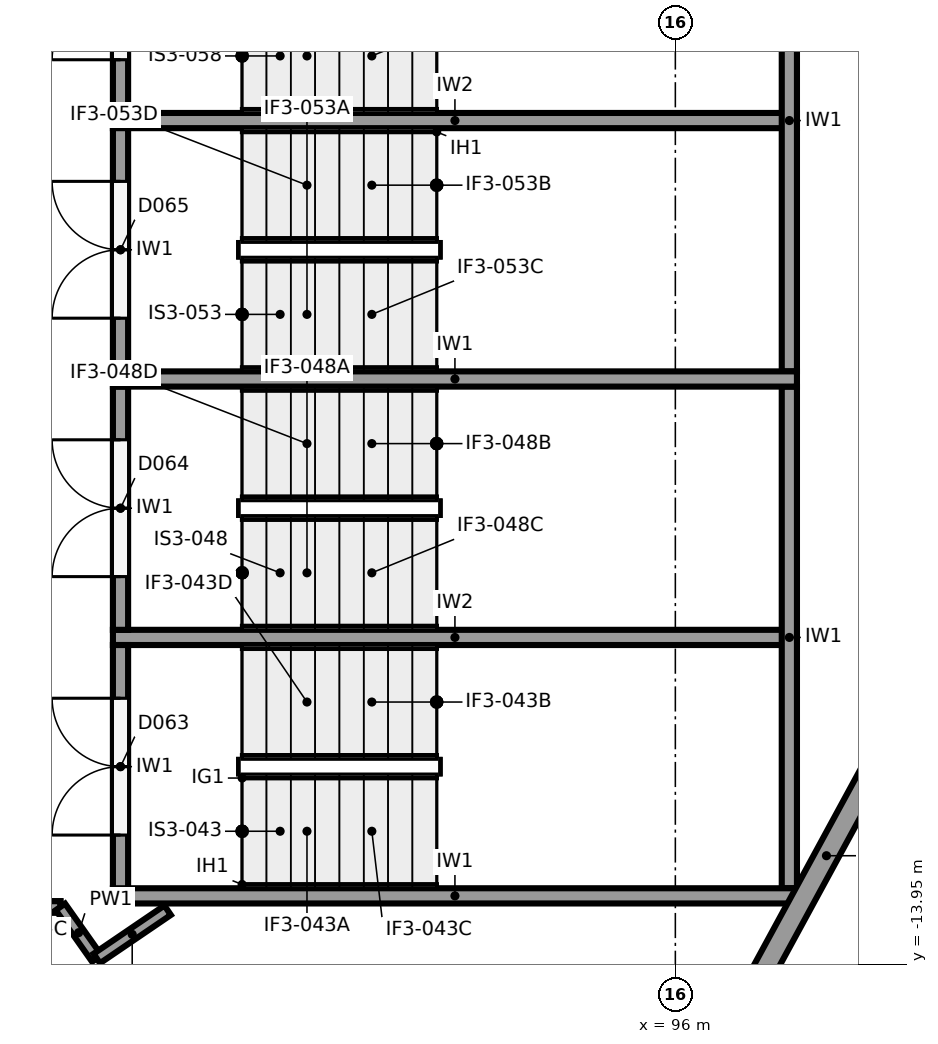
"""IFC4 building model, lengths in metres.
Left out: names, types, materials, properties, quantities, classifications, styles, units other than length and angle.
Written with IfcOpenShell. Run it as: python <this file> out.ifc"""

import sys

from ifc_helpers import new_model, si_unit, direction, frame, frame_2d, origin, place, context, subcontext, project, spatial, rectangle, extrude, element, fill, save


model = new_model("IFC4")
c1 = context("Model", 3, precision=1e-05, world=origin(), true_north=direction((0.0, 1.0)))
c2 = subcontext(c1, "Body", "Model", "MODEL_VIEW")
j1 = project(units=[si_unit("LENGTHUNIT", "METRE"), si_unit("PLANEANGLEUNIT", "RADIAN")], contexts=[c1])
p1 = place(None, origin())
s1 = spatial("IfcSite", under=j1, at=p1, CompositionType="ELEMENT")
p2 = place(p1, origin())
s2 = spatial("IfcBuilding", under=s1, at=p2, CompositionType="ELEMENT")
p3 = place(p2, frame((0.0, 0.0, 6.5)))
s3 = spatial("IfcBuildingStorey", under=s2, at=p3, CompositionType="ELEMENT", Elevation=6.5)
p4 = place(p3, frame((101.161, -6.689, 0.0), z_axis=(0.0, 0.0, 1.0), x_axis=(-0.477867771117, -0.878431780691, 0.0)))
e1 = element("IfcWall", 1, at=p4, inside=s3, PredefinedType="SOLIDWALL", context=c2, shape_type="SweptSolid", body=[
    extrude(rectangle(XDim=13.28, YDim=0.3, at=frame_2d((6.64, 0.0))), origin(), (0.0, 0.0, 1.0), 3.85),
])
p5 = place(p4, frame((9.03, 0.0, 0.0)))
e2 = element("IfcOpeningElement", 2, at=p5, cuts=e1, PredefinedType="OPENING", context=c2, shape_type="SweptSolid", body=[
    extrude(rectangle(XDim=1.8, YDim=2.4, at=frame_2d((0.9, 1.2))), frame((0.0, 0.16, 0.0), z_axis=(0.0, -1.0, 0.0), x_axis=(1.0, 0.0, 0.0)), (0.0, 0.0, 1.0), 0.32),
])
p6 = place(p3, frame((94.815, 5.855, 0.0), z_axis=(0.0, 0.0, 1.0), x_axis=(0.477867771117, -0.878431780691, 0.0)))
e3 = element("IfcWall", 3, at=p6, inside=s3, PredefinedType="SOLIDWALL", context=c2, shape_type="SweptSolid", body=[
    extrude(rectangle(XDim=13.28, YDim=0.35, at=frame_2d((6.64, 0.0))), origin(), (0.0, 0.0, 1.0), 3.85),
])
p7 = place(p6, frame((3.95, 0.0, 0.0)))
e4 = element("IfcOpeningElement", 4, at=p7, cuts=e3, PredefinedType="OPENING", context=c2, shape_type="SweptSolid", body=[
    extrude(rectangle(XDim=1.0, YDim=2.1, at=frame_2d((0.5, 1.05))), frame((0.0, 0.185, 0.0), z_axis=(0.0, -1.0, 0.0), x_axis=(1.0, 0.0, 0.0)), (0.0, 0.0, 1.0), 0.37),
])
for number, where, z_axis, x_axis in (
    (5, (97.6, -13.05, 0.0), (0.0, 0.0, 1.0), (-1.0, 0.0, 0.0)),
    (6, (97.6, -6.25, 0.0), (0.0, 0.0, 1.0), (-1.0, 0.0, 0.0)),
):
    element("IfcWall", number, at=place(p3, frame(where, z_axis=z_axis, x_axis=x_axis)), inside=s3, PredefinedType="SHEAR", context=c2, shape_type="SweptSolid", body=[
        extrude(rectangle(XDim=9.0, YDim=0.2, at=frame_2d((4.5, 0.0))), origin(), (0.0, 0.0, 1.0), 5.15),
    ])
for number, where, z_axis, x_axis in (
    (7, (97.5, -12.95, 0.0), (0.0, 0.0, 1.0), (0.0, 1.0, 0.0)),
    (8, (97.5, -6.15, 0.0), (0.0, 0.0, 1.0), (0.0, 1.0, 0.0)),
):
    element("IfcWall", number, at=place(p3, frame(where, z_axis=z_axis, x_axis=x_axis)), inside=s3, PredefinedType="SHEAR", context=c2, shape_type="SweptSolid", body=[
        extrude(rectangle(XDim=6.6, YDim=0.2, at=frame_2d((3.3, 0.0))), origin(), (0.0, 0.0, 1.0), 5.15),
    ])
for number, where, z_axis, x_axis in (
    (9, (97.6, -9.65, 0.0), (0.0, 0.0, 1.0), (-1.0, 0.0, 0.0)),
    (10, (97.6, -2.85, 0.0), (0.0, 0.0, 1.0), (-1.0, 0.0, 0.0)),
):
    element("IfcWall", number, at=place(p3, frame(where, z_axis=z_axis, x_axis=x_axis)), inside=s3, PredefinedType="SHEAR", context=c2, shape_type="SweptSolid", body=[
        extrude(rectangle(XDim=9.0, YDim=0.2, at=frame_2d((4.5, 0.0))), origin(), (0.0, 0.0, 1.0), 5.15),
    ])
p8 = place(p3, frame((88.7, -12.95, 0.0), z_axis=(0.0, 0.0, 1.0), x_axis=(0.0, 1.0, 0.0)))
e11 = element("IfcWall", 11, at=p8, inside=s3, PredefinedType="SHEAR", context=c2, shape_type="SweptSolid", body=[
    extrude(rectangle(XDim=3.2, YDim=0.2, at=frame_2d((1.6, 0.0))), origin(), (0.0, 0.0, 1.0), 5.15),
])
p9 = place(p8, frame((0.7, 0.0, 0.0)))
e12 = element("IfcOpeningElement", 12, at=p9, cuts=e11, PredefinedType="OPENING", context=c2, shape_type="SweptSolid", body=[
    extrude(rectangle(XDim=1.8, YDim=2.1, at=frame_2d((0.9, 1.05))), frame((0.0, 0.11, 0.0), z_axis=(0.0, -1.0, 0.0), x_axis=(1.0, 0.0, 0.0)), (0.0, 0.0, 1.0), 0.22),
])
p10 = place(p3, frame((88.7, -9.55, 0.0), z_axis=(0.0, 0.0, 1.0), x_axis=(0.0, 1.0, 0.0)))
e13 = element("IfcWall", 13, at=p10, inside=s3, PredefinedType="SHEAR", context=c2, shape_type="SweptSolid", body=[
    extrude(rectangle(XDim=3.2, YDim=0.2, at=frame_2d((1.6, 0.0))), origin(), (0.0, 0.0, 1.0), 5.15),
])
p11 = place(p10, frame((0.7, 0.0, 0.0)))
e14 = element("IfcOpeningElement", 14, at=p11, cuts=e13, PredefinedType="OPENING", context=c2, shape_type="SweptSolid", body=[
    extrude(rectangle(XDim=1.8, YDim=2.1, at=frame_2d((0.9, 1.05))), frame((0.0, 0.11, 0.0), z_axis=(0.0, -1.0, 0.0), x_axis=(1.0, 0.0, 0.0)), (0.0, 0.0, 1.0), 0.22),
])
p12 = place(p3, frame((88.7, -6.15, 0.0), z_axis=(0.0, 0.0, 1.0), x_axis=(0.0, 1.0, 0.0)))
e15 = element("IfcWall", 15, at=p12, inside=s3, PredefinedType="SHEAR", context=c2, shape_type="SweptSolid", body=[
    extrude(rectangle(XDim=3.2, YDim=0.2, at=frame_2d((1.6, 0.0))), origin(), (0.0, 0.0, 1.0), 5.15),
])
p13 = place(p12, frame((0.7, 0.0, 0.0)))
e16 = element("IfcOpeningElement", 16, at=p13, cuts=e15, PredefinedType="OPENING", context=c2, shape_type="SweptSolid", body=[
    extrude(rectangle(XDim=1.8, YDim=2.1, at=frame_2d((0.9, 1.05))), frame((0.0, 0.11, 0.0), z_axis=(0.0, -1.0, 0.0), x_axis=(1.0, 0.0, 0.0)), (0.0, 0.0, 1.0), 0.22),
])
p14 = place(p3, frame((88.7, -2.75, 0.0), z_axis=(0.0, 0.0, 1.0), x_axis=(0.0, 1.0, 0.0)))
e17 = element("IfcWall", 17, at=p14, inside=s3, PredefinedType="SHEAR", context=c2, shape_type="SweptSolid", body=[
    extrude(rectangle(XDim=3.2, YDim=0.2, at=frame_2d((1.6, 0.0))), origin(), (0.0, 0.0, 1.0), 5.15),
])
p15 = place(p14, frame((0.7, 0.0, 0.0)))
e18 = element("IfcOpeningElement", 18, at=p15, cuts=e17, PredefinedType="OPENING", context=c2, shape_type="SweptSolid", body=[
    extrude(rectangle(XDim=1.8, YDim=2.1, at=frame_2d((0.9, 1.05))), frame((0.0, 0.11, 0.0), z_axis=(0.0, -1.0, 0.0), x_axis=(1.0, 0.0, 0.0)), (0.0, 0.0, 1.0), 0.22),
])
p16 = place(p3, frame((81.555, -13.195, 0.0), z_axis=(0.0, 0.0, 1.0), x_axis=(0.999999999262, -3.8421639e-05, 0.0)))
e19 = element("IfcWall", 19, at=p16, inside=s3, PredefinedType="PARTITIONING", context=c2, shape_type="SweptSolid", body=[
    extrude(rectangle(XDim=6.354, YDim=0.15, at=frame_2d((3.177, 0.0))), origin(), (0.0, 0.0, 1.0), 4.05),
])
p17 = place(p16, frame((3.85, 0.0, 0.0)))
e20 = element("IfcOpeningElement", 20, at=p17, cuts=e19, PredefinedType="OPENING", context=c2, shape_type="SweptSolid", body=[
    extrude(rectangle(XDim=1.8, YDim=2.1, at=frame_2d((0.9, 1.05))), frame((0.0, 0.085, 0.0), z_axis=(0.0, -1.0, 0.0), x_axis=(1.0, 0.0, 0.0)), (0.0, 0.0, 1.0), 0.17),
])
p18 = place(p3, frame((87.255, -13.195, 4.05), z_axis=(0.0, 0.0, 1.0), x_axis=(1.0, 0.0, 0.0)))
e21 = element("IfcWall", 21, at=p18, inside=s3, PredefinedType="PARTITIONING", context=c2, shape_type="SweptSolid", body=[
    extrude(rectangle(XDim=0.654, YDim=0.15, at=frame_2d((0.327, 0.0))), origin(), (0.0, 0.0, 1.0), 1.1),
])
p19 = place(p3, frame((87.909, -13.195, 0.0), z_axis=(0.0, 0.0, 1.0), x_axis=(0.576359888906, -0.817195985342, 0.0)))
e22 = element("IfcWall", 22, at=p19, inside=s3, PredefinedType="PARTITIONING", context=c2, shape_type="SweptSolid", body=[
    extrude(rectangle(XDim=0.83, YDim=0.15, at=frame_2d((0.415, 0.0))), origin(), (0.0, 0.0, 1.0), 5.15),
])
p20 = place(p3, frame((88.388, -13.874, 0.0), z_axis=(0.0, 0.0, 1.0), x_axis=(0.826749248939, 0.562570599462, 0.0)))
e23 = element("IfcWall", 23, at=p20, inside=s3, PredefinedType="PARTITIONING", context=c2, shape_type="SweptSolid", body=[
    extrude(rectangle(XDim=1.127, YDim=0.15, at=frame_2d((0.564, 0.0))), origin(), (0.0, 0.0, 1.0), 5.15),
])
p21 = place(p9, origin())
e24 = element("IfcDoor", 24, at=p21, inside=s3, OperationType="DOUBLE_DOOR_SINGLE_SWING", PredefinedType="DOOR", context=c2, shape_type="SweptSolid", body=[
    extrude(rectangle(XDim=1.8, YDim=2.1, at=frame_2d((0.9, 1.05))), frame((0.0, 0.025, 0.0), z_axis=(0.0, -1.0, 0.0), x_axis=(1.0, 0.0, 0.0)), (0.0, 0.0, 1.0), 0.05),
])
fill(e12, e24)
p22 = place(p11, origin())
e25 = element("IfcDoor", 25, at=p22, inside=s3, OperationType="DOUBLE_DOOR_SINGLE_SWING", PredefinedType="DOOR", context=c2, shape_type="SweptSolid", body=[
    extrude(rectangle(XDim=1.8, YDim=2.1, at=frame_2d((0.9, 1.05))), frame((0.0, 0.025, 0.0), z_axis=(0.0, -1.0, 0.0), x_axis=(1.0, 0.0, 0.0)), (0.0, 0.0, 1.0), 0.05),
])
fill(e14, e25)
p23 = place(p13, origin())
e26 = element("IfcDoor", 26, at=p23, inside=s3, OperationType="DOUBLE_DOOR_SINGLE_SWING", PredefinedType="DOOR", context=c2, shape_type="SweptSolid", body=[
    extrude(rectangle(XDim=1.8, YDim=2.1, at=frame_2d((0.9, 1.05))), frame((0.0, 0.025, 0.0), z_axis=(0.0, -1.0, 0.0), x_axis=(1.0, 0.0, 0.0)), (0.0, 0.0, 1.0), 0.05),
])
fill(e16, e26)
p24 = place(p15, origin())
e27 = element("IfcDoor", 27, at=p24, inside=s3, OperationType="DOUBLE_DOOR_SINGLE_SWING", PredefinedType="DOOR", context=c2, shape_type="SweptSolid", body=[
    extrude(rectangle(XDim=1.8, YDim=2.1, at=frame_2d((0.9, 1.05))), frame((0.0, 0.025, 0.0), z_axis=(0.0, -1.0, 0.0), x_axis=(1.0, 0.0, 0.0)), (0.0, 0.0, 1.0), 0.05),
])
fill(e18, e27)
save(model, sys.argv[1])
